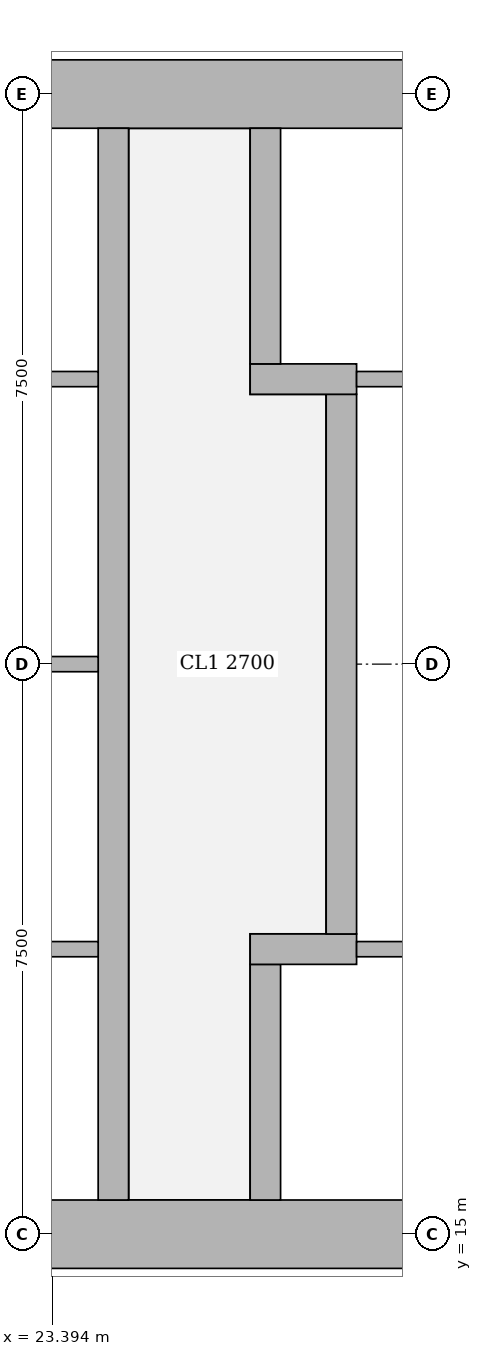
"""IFC4 building model, lengths in metres.
Left out: names, types, materials, properties, quantities, classifications, styles, units other than length and angle.
Written with IfcOpenShell. Run it as: python <this file> out.ifc"""

import sys

from ifc_helpers import new_model, si_unit, direction, frame, frame_2d, origin, place, context, subcontext, project, spatial, rectangle, extrude, element, fill, save


model = new_model("IFC4")
c1 = context("Model", 3, precision=1e-05, world=origin(), true_north=direction((0.0, 1.0)))
c2 = subcontext(c1, "Body", "Model", "MODEL_VIEW")
j1 = project(units=[si_unit("LENGTHUNIT", "METRE"), si_unit("PLANEANGLEUNIT", "RADIAN")], contexts=[c1])
p1 = place(None, origin())
s1 = spatial("IfcSite", under=j1, at=p1, CompositionType="ELEMENT")
p2 = place(p1, origin())
s2 = spatial("IfcBuilding", under=s1, at=p2, CompositionType="ELEMENT")
p3 = place(p2, frame((0.0, 0.0, 262.85)))
s3 = spatial("IfcBuildingStorey", under=s2, at=p3, CompositionType="ELEMENT", Elevation=262.85)
p4 = place(p3, frame((13.95, 15.0, 0.0), z_axis=(0.0, 0.0, 1.0), x_axis=(1.0, 0.0, 0.0)))
e1 = element("IfcWall", 1, at=p4, inside=s3, PredefinedType="SHEAR", context=c2, shape_type="SweptSolid", body=[
    extrude(rectangle(XDim=15.3, YDim=0.9, at=frame_2d((7.65, 0.0))), origin(), (0.0, 0.0, 1.0), 3.75),
])
p5 = place(p4, frame((4.45, 0.0, 0.0)))
e2 = element("IfcOpeningElement", 2, at=p5, cuts=e1, PredefinedType="OPENING", context=c2, shape_type="SweptSolid", body=[
    extrude(rectangle(XDim=1.8, YDim=2.1, at=frame_2d((0.9, 1.05))), frame((0.0, 0.46, 0.0), z_axis=(0.0, -1.0, 0.0), x_axis=(1.0, 0.0, 0.0)), (0.0, 0.0, 1.0), 0.92),
])
p6 = place(p4, frame((10.7, 0.0, 0.0)))
e3 = element("IfcOpeningElement", 3, at=p6, cuts=e1, PredefinedType="OPENING", context=c2, shape_type="SweptSolid", body=[
    extrude(rectangle(XDim=1.1, YDim=2.1, at=frame_2d((0.55, 1.05))), frame((0.0, 0.46, 0.0), z_axis=(0.0, -1.0, 0.0), x_axis=(1.0, 0.0, 0.0)), (0.0, 0.0, 1.0), 0.92),
])
p7 = place(p3, frame((13.95, 30.0, 0.0), z_axis=(0.0, 0.0, 1.0), x_axis=(1.0, 0.0, 0.0)))
e4 = element("IfcWall", 4, at=p7, inside=s3, PredefinedType="SHEAR", context=c2, shape_type="SweptSolid", body=[
    extrude(rectangle(XDim=15.3, YDim=0.9, at=frame_2d((7.65, 0.0))), origin(), (0.0, 0.0, 1.0), 3.75),
])
p8 = place(p7, frame((4.45, 0.0, 0.0)))
e5 = element("IfcOpeningElement", 5, at=p8, cuts=e4, PredefinedType="OPENING", context=c2, shape_type="SweptSolid", body=[
    extrude(rectangle(XDim=1.8, YDim=2.1, at=frame_2d((0.9, 1.05))), frame((0.0, 0.46, 0.0), z_axis=(0.0, -1.0, 0.0), x_axis=(1.0, 0.0, 0.0)), (0.0, 0.0, 1.0), 0.92),
])
p9 = place(p7, frame((10.7, 0.0, 0.0)))
e6 = element("IfcOpeningElement", 6, at=p9, cuts=e4, PredefinedType="OPENING", context=c2, shape_type="SweptSolid", body=[
    extrude(rectangle(XDim=1.1, YDim=2.1, at=frame_2d((0.55, 1.05))), frame((0.0, 0.46, 0.0), z_axis=(0.0, -1.0, 0.0), x_axis=(1.0, 0.0, 0.0)), (0.0, 0.0, 1.0), 0.92),
])
p10 = place(p3, frame((24.2, 15.45, 0.0), z_axis=(0.0, 0.0, 1.0), x_axis=(0.0, 1.0, 0.0)))
e7 = element("IfcWall", 7, at=p10, inside=s3, PredefinedType="SHEAR", context=c2, shape_type="SweptSolid", body=[
    extrude(rectangle(XDim=14.1, YDim=0.4, at=frame_2d((7.05, 0.0))), origin(), (0.0, 0.0, 1.0), 3.75),
])
p11 = place(p3, frame((26.2, 15.45, 0.0), z_axis=(0.0, 0.0, 1.0), x_axis=(0.0, 1.0, 0.0)))
e8 = element("IfcWall", 8, at=p11, inside=s3, PredefinedType="SHEAR", context=c2, shape_type="SweptSolid", body=[
    extrude(rectangle(XDim=3.1, YDim=0.4, at=frame_2d((1.55, 0.0))), origin(), (0.0, 0.0, 1.0), 3.75),
])
p12 = place(p11, frame((0.825, 0.0, 0.0)))
e9 = element("IfcOpeningElement", 9, at=p12, cuts=e8, PredefinedType="OPENING", context=c2, shape_type="SweptSolid", body=[
    extrude(rectangle(XDim=1.2, YDim=2.1, at=frame_2d((0.6, 1.05))), frame((0.0, 0.21, 0.0), z_axis=(0.0, -1.0, 0.0), x_axis=(1.0, 0.0, 0.0)), (0.0, 0.0, 1.0), 0.42),
])
p13 = place(p3, frame((26.0, 18.75, 0.0), z_axis=(0.0, 0.0, 1.0), x_axis=(1.0, 0.0, 0.0)))
e10 = element("IfcWall", 10, at=p13, inside=s3, PredefinedType="SHEAR", context=c2, shape_type="SweptSolid", body=[
    extrude(rectangle(XDim=1.4, YDim=0.4, at=frame_2d((0.7, 0.0))), origin(), (0.0, 0.0, 1.0), 3.75),
])
p14 = place(p3, frame((27.2, 18.95, 0.0), z_axis=(0.0, 0.0, 1.0), x_axis=(0.0, 1.0, 0.0)))
e11 = element("IfcWall", 11, at=p14, inside=s3, PredefinedType="SHEAR", context=c2, shape_type="SweptSolid", body=[
    extrude(rectangle(XDim=7.1, YDim=0.4, at=frame_2d((3.55, 0.0))), origin(), (0.0, 0.0, 1.0), 3.75),
])
p15 = place(p3, frame((26.0, 26.25, 0.0), z_axis=(0.0, 0.0, 1.0), x_axis=(1.0, 0.0, 0.0)))
e12 = element("IfcWall", 12, at=p15, inside=s3, PredefinedType="SHEAR", context=c2, shape_type="SweptSolid", body=[
    extrude(rectangle(XDim=1.4, YDim=0.4, at=frame_2d((0.7, 0.0))), origin(), (0.0, 0.0, 1.0), 3.75),
])
p16 = place(p3, frame((26.2, 26.45, 0.0), z_axis=(0.0, 0.0, 1.0), x_axis=(0.0, 1.0, 0.0)))
e13 = element("IfcWall", 13, at=p16, inside=s3, PredefinedType="SHEAR", context=c2, shape_type="SweptSolid", body=[
    extrude(rectangle(XDim=3.1, YDim=0.4, at=frame_2d((1.55, 0.0))), origin(), (0.0, 0.0, 1.0), 3.75),
])
p17 = place(p16, frame((1.075, 0.0, 0.0)))
e14 = element("IfcOpeningElement", 14, at=p17, cuts=e13, PredefinedType="OPENING", context=c2, shape_type="SweptSolid", body=[
    extrude(rectangle(XDim=1.2, YDim=2.1, at=frame_2d((0.6, 1.05))), frame((0.0, 0.21, 0.0), z_axis=(0.0, -1.0, 0.0), x_axis=(1.0, 0.0, 0.0)), (0.0, 0.0, 1.0), 0.42),
])
for number, where, z_axis, x_axis in (
    (15, (21.8, 18.75, 0.0), (0.0, 0.0, 1.0), (1.0, 0.0, 0.0)),
    (16, (21.8, 22.5, 0.0), (0.0, 0.0, 1.0), (1.0, 0.0, 0.0)),
    (17, (21.8, 26.25, 0.0), (0.0, 0.0, 1.0), (1.0, 0.0, 0.0)),
):
    element("IfcWall", number, at=place(p3, frame(where, z_axis=z_axis, x_axis=x_axis)), inside=s3, PredefinedType="SOLIDWALL", context=c2, shape_type="SweptSolid", body=[
        extrude(rectangle(XDim=2.2, YDim=0.2, at=frame_2d((1.1, 0.0))), origin(), (0.0, 0.0, 1.0), 3.5),
    ])
for number, where, z_axis, x_axis in (
    (18, (27.4, 18.75, 0.0), (0.0, 0.0, 1.0), (1.0, 0.0, 0.0)),
    (19, (27.4, 26.25, 0.0), (0.0, 0.0, 1.0), (1.0, 0.0, 0.0)),
):
    element("IfcWall", number, at=place(p3, frame(where, z_axis=z_axis, x_axis=x_axis)), inside=s3, PredefinedType="SOLIDWALL", context=c2, shape_type="SweptSolid", body=[
        extrude(rectangle(XDim=0.95, YDim=0.2, at=frame_2d((0.475, 0.0))), origin(), (0.0, 0.0, 1.0), 3.5),
    ])
p18 = place(p6, origin())
e20 = element("IfcDoor", 20, at=p18, inside=s3, OperationType="SINGLE_SWING_LEFT", PredefinedType="DOOR", context=c2, shape_type="SweptSolid", body=[
    extrude(rectangle(XDim=1.1, YDim=2.1, at=frame_2d((0.55, 1.05))), frame((0.0, 0.025, 0.0), z_axis=(0.0, -1.0, 0.0), x_axis=(1.0, 0.0, 0.0)), (0.0, 0.0, 1.0), 0.05),
])
fill(e3, e20)
p19 = place(p9, origin())
e21 = element("IfcDoor", 21, at=p19, inside=s3, OperationType="SINGLE_SWING_LEFT", PredefinedType="DOOR", context=c2, shape_type="SweptSolid", body=[
    extrude(rectangle(XDim=1.1, YDim=2.1, at=frame_2d((0.55, 1.05))), frame((0.0, 0.025, 0.0), z_axis=(0.0, -1.0, 0.0), x_axis=(1.0, 0.0, 0.0)), (0.0, 0.0, 1.0), 0.05),
])
fill(e6, e21)
p20 = place(p12, origin())
e22 = element("IfcDoor", 22, at=p20, inside=s3, OperationType="DOUBLE_DOOR_SLIDING", PredefinedType="DOOR", context=c2, shape_type="SweptSolid", body=[
    extrude(rectangle(XDim=1.2, YDim=2.1, at=frame_2d((0.6, 1.05))), frame((0.0, 0.025, 0.0), z_axis=(0.0, -1.0, 0.0), x_axis=(1.0, 0.0, 0.0)), (0.0, 0.0, 1.0), 0.05),
])
fill(e9, e22)
p21 = place(p17, origin())
e23 = element("IfcDoor", 23, at=p21, inside=s3, OperationType="DOUBLE_DOOR_SLIDING", PredefinedType="DOOR", context=c2, shape_type="SweptSolid", body=[
    extrude(rectangle(XDim=1.2, YDim=2.1, at=frame_2d((0.6, 1.05))), frame((0.0, 0.025, 0.0), z_axis=(0.0, -1.0, 0.0), x_axis=(1.0, 0.0, 0.0)), (0.0, 0.0, 1.0), 0.05),
])
fill(e14, e23)
save(model, sys.argv[1])
